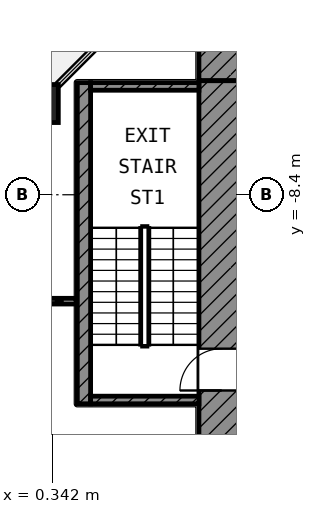
"""IFC4 building model, lengths in metres.
Left out: names, types, materials, properties, quantities, classifications, styles, units other than length and angle.
Written with IfcOpenShell. Run it as: python <this file> out.ifc"""

import sys

from ifc_helpers import new_model, si_unit, direction, frame, frame_2d, origin, origin_2d, place, context, subcontext, project, spatial, rectangle, extrude, element, fill, save


model = new_model("IFC4")
c1 = context("Model", 3, precision=1e-05, world=origin(), true_north=direction((0.0, 1.0)))
c2 = subcontext(c1, "Body", "Model", "MODEL_VIEW")
j1 = project(units=[si_unit("LENGTHUNIT", "METRE"), si_unit("PLANEANGLEUNIT", "RADIAN")], contexts=[c1])
p1 = place(None, origin())
s1 = spatial("IfcSite", under=j1, at=p1, CompositionType="ELEMENT")
p2 = place(p1, origin())
s2 = spatial("IfcBuilding", under=s1, at=p2, CompositionType="ELEMENT")
p3 = place(p2, frame((0.0, 0.0, 175.2)))
s3 = spatial("IfcBuildingStorey", under=s2, at=p3, CompositionType="ELEMENT", Elevation=175.2)
p4 = place(p3, frame((0.0, -6.0, 0.0), z_axis=(0.0, 0.0, 1.0), x_axis=(1.0, 0.0, 0.0)))
e1 = element("IfcColumn", 1, at=p4, inside=s3, PredefinedType="COLUMN", context=c2, shape_type="SweptSolid", body=[
    extrude(rectangle(XDim=1.0, YDim=1.0, at=origin_2d()), origin(), (0.0, 0.0, 1.0), 4.2),
])
p5 = place(p3, frame((4.2, -4.8, 0.0), z_axis=(0.0, 0.0, 1.0), x_axis=(1.0, 0.0, 0.0)))
e2 = element("IfcWall", 2, at=p5, inside=s3, PredefinedType="SHEAR", context=c2, shape_type="SweptSolid", body=[
    extrude(rectangle(XDim=20.7, YDim=1.2, at=frame_2d((10.35, 0.0))), origin(), (0.0, 0.0, 1.0), 3.6),
])
p6 = place(p5, frame((1.95, 0.0, 0.0)))
e3 = element("IfcOpeningElement", 3, at=p6, cuts=e2, PredefinedType="OPENING", context=c2, shape_type="SweptSolid", body=[
    extrude(rectangle(XDim=1.1, YDim=2.1, at=frame_2d((0.55, 1.05))), frame((0.0, 0.61, 0.0), z_axis=(0.0, -1.0, 0.0), x_axis=(1.0, 0.0, 0.0)), (0.0, 0.0, 1.0), 1.22),
])
p7 = place(p5, frame((17.95, 0.0, 0.0)))
e4 = element("IfcOpeningElement", 4, at=p7, cuts=e2, PredefinedType="OPENING", context=c2, shape_type="SweptSolid", body=[
    extrude(rectangle(XDim=1.1, YDim=2.1, at=frame_2d((0.55, 1.05))), frame((0.0, 0.61, 0.0), z_axis=(0.0, -1.0, 0.0), x_axis=(1.0, 0.0, 0.0)), (0.0, 0.0, 1.0), 1.22),
])
p8 = place(p3, frame((4.8, -24.9, 0.0), z_axis=(0.0, 0.0, 1.0), x_axis=(0.0, 1.0, 0.0)))
e5 = element("IfcWall", 5, at=p8, inside=s3, PredefinedType="SHEAR", context=c2, shape_type="SweptSolid", body=[
    extrude(rectangle(XDim=19.5, YDim=1.2, at=frame_2d((9.75, 0.0))), origin(), (0.0, 0.0, 1.0), 3.6),
])
p9 = place(p8, frame((11.35, 0.0, 0.0)))
e6 = element("IfcOpeningElement", 6, at=p9, cuts=e5, PredefinedType="OPENING", context=c2, shape_type="SweptSolid", body=[
    extrude(rectangle(XDim=1.1, YDim=2.1, at=frame_2d((0.55, 1.05))), frame((0.0, 0.61, 0.0), z_axis=(0.0, -1.0, 0.0), x_axis=(1.0, 0.0, 0.0)), (0.0, 0.0, 1.0), 1.22),
])
p10 = place(p8, frame((2.05, 0.0, 0.0)))
e7 = element("IfcOpeningElement", 7, at=p10, cuts=e5, PredefinedType="OPENING", context=c2, shape_type="SweptSolid", body=[
    extrude(rectangle(XDim=1.1, YDim=2.1, at=frame_2d((0.55, 1.05))), frame((0.0, 0.61, 0.0), z_axis=(0.0, -1.0, 0.0), x_axis=(1.0, 0.0, 0.0)), (0.0, 0.0, 1.0), 1.22),
])
p11 = place(p3, frame((1.175, -13.9, 0.0), z_axis=(0.0, 0.0, 1.0), x_axis=(0.0, 1.0, 0.0)))
e8 = element("IfcWall", 8, at=p11, inside=s3, PredefinedType="SHEAR", context=c2, shape_type="SweptSolid", body=[
    extrude(rectangle(XDim=8.45, YDim=0.35, at=frame_2d((4.225, 0.0))), origin(), (0.0, 0.0, 1.0), 3.6),
])
for number, where, z_axis, x_axis in (
    (9, (1.35, -5.55, 0.0), (0.0, 0.0, 1.0), (1.0, 0.0, 0.0)),
    (10, (1.35, -13.8, 0.0), (0.0, 0.0, 1.0), (1.0, 0.0, 0.0)),
):
    element("IfcWall", number, at=place(p3, frame(where, z_axis=z_axis, x_axis=x_axis)), inside=s3, PredefinedType="SHEAR", context=c2, shape_type="SweptSolid", body=[
        extrude(rectangle(XDim=2.85, YDim=0.2, at=frame_2d((1.425, 0.0))), origin(), (0.0, 0.0, 1.0), 3.6),
    ])
p12 = place(p3, frame((0.08, -11.2, 0.0), z_axis=(0.0, 0.0, 1.0), x_axis=(1.0, 0.0, 0.0)))
e11 = element("IfcWall", 11, at=p12, inside=s3, PredefinedType="PARTITIONING", context=c2, shape_type="SweptSolid", body=[
    extrude(rectangle(XDim=0.89, YDim=0.15, at=frame_2d((0.445, 0.0))), origin(), (0.0, 0.0, 1.0), 3.6),
])
p13 = place(p9, origin())
e12 = element("IfcDoor", 12, at=p13, inside=s3, OperationType="SINGLE_SWING_LEFT", PredefinedType="DOOR", context=c2, shape_type="SweptSolid", body=[
    extrude(rectangle(XDim=1.1, YDim=2.1, at=frame_2d((0.55, 1.05))), frame((0.0, 0.025, 0.0), z_axis=(0.0, -1.0, 0.0), x_axis=(1.0, 0.0, 0.0)), (0.0, 0.0, 1.0), 0.05),
])
fill(e6, e12)
save(model, sys.argv[1])
